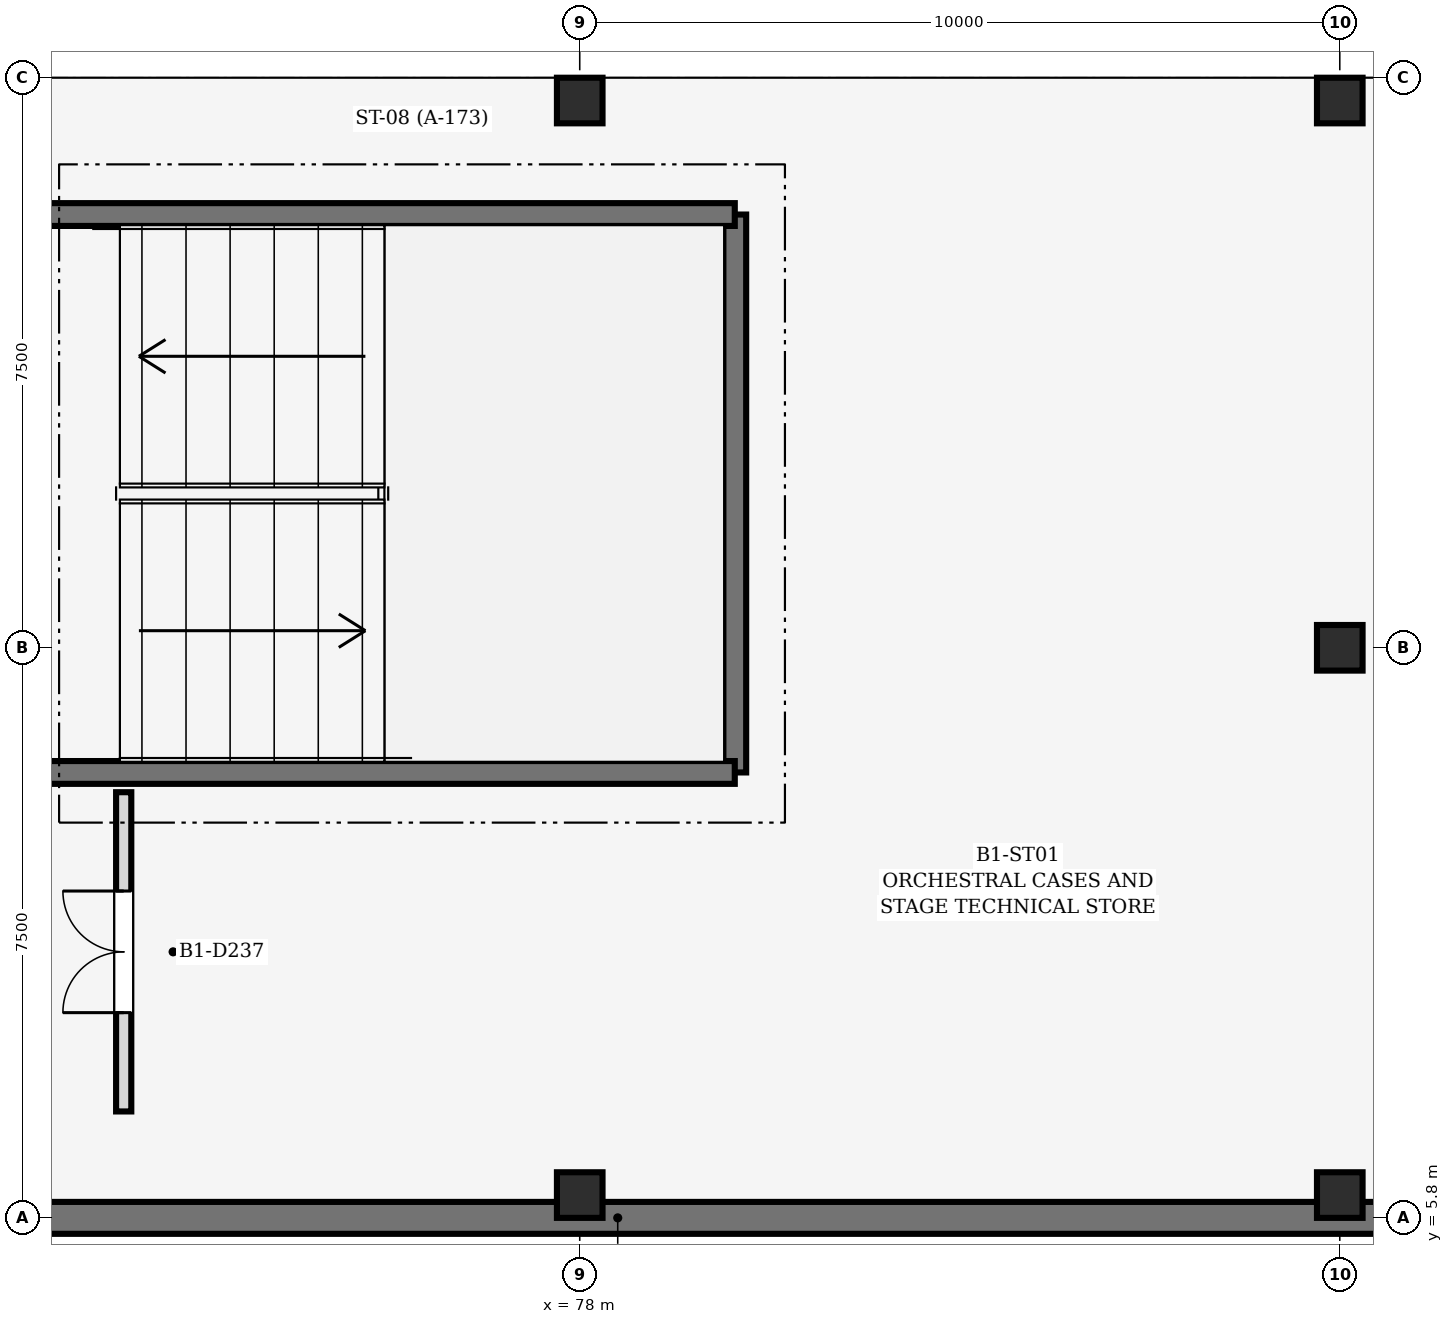
"""IFC4 building model, lengths in metres.
Left out: names, types, materials, properties, quantities, classifications, styles, units other than length and angle.
Written with IfcOpenShell. Run it as: python <this file> out.ifc"""

import sys

from ifc_helpers import new_model, si_unit, direction, frame, frame_2d, origin, origin_2d, place, context, subcontext, project, spatial, rectangle, extrude, element, fill, save


model = new_model("IFC4")
c1 = context("Model", 3, precision=1e-05, world=origin(), true_north=direction((0.0, 1.0)))
c2 = subcontext(c1, "Body", "Model", "MODEL_VIEW")
j1 = project(units=[si_unit("LENGTHUNIT", "METRE"), si_unit("PLANEANGLEUNIT", "RADIAN")], contexts=[c1])
p1 = place(None, origin())
s1 = spatial("IfcSite", under=j1, at=p1, CompositionType="ELEMENT")
p2 = place(p1, origin())
s2 = spatial("IfcBuilding", under=s1, at=p2, CompositionType="ELEMENT")
p3 = place(p2, frame((0.0, 0.0, -4.8)))
s3 = spatial("IfcBuildingStorey", under=s2, at=p3, CompositionType="ELEMENT", Elevation=-4.8)
for number, where, z_axis, x_axis in (
    (1, (78.0, 6.1, 0.0), (0.0, 0.0, 1.0), (1.0, 0.0, 0.0)),
    (2, (78.0, 20.5, 0.0), (0.0, 0.0, 1.0), (1.0, 0.0, 0.0)),
    (3, (88.0, 6.1, 0.0), (0.0, 0.0, 1.0), (1.0, 0.0, 0.0)),
    (4, (88.0, 13.3, 0.0), (0.0, 0.0, 1.0), (1.0, 0.0, 0.0)),
    (5, (88.0, 20.5, 0.0), (0.0, 0.0, 1.0), (1.0, 0.0, 0.0)),
):
    element("IfcColumn", number, at=place(p3, frame(where, z_axis=z_axis, x_axis=x_axis)), inside=s3, PredefinedType="COLUMN", context=c2, shape_type="SweptSolid", body=[
        extrude(rectangle(XDim=0.6, YDim=0.6, at=origin_2d()), origin(), (0.0, 0.0, 1.0), 4.8),
    ])
p4 = place(p3, frame((48.8, 5.8, 0.0), z_axis=(0.0, 0.0, 1.0), x_axis=(1.0, 0.0, 0.0)))
e6 = element("IfcWall", 6, at=p4, inside=s3, PredefinedType="SOLIDWALL", context=c2, shape_type="SweptSolid", body=[
    extrude(rectangle(XDim=47.2, YDim=0.42, at=frame_2d((23.6, 0.0))), origin(), (0.0, 0.0, 1.0), 4.48),
])
p5 = place(p3, frame((80.04, 19.0, 0.0), z_axis=(0.0, 0.0, 1.0), x_axis=(0.0, -1.0, 0.0)))
e7 = element("IfcWall", 7, at=p5, inside=s3, PredefinedType="SHEAR", context=c2, shape_type="SweptSolid", body=[
    extrude(rectangle(XDim=7.34, YDim=0.3, at=frame_2d((3.67, 0.0))), origin(), (0.0, 0.0, 1.0), 4.52),
])
for number, where, z_axis, x_axis in (
    (8, (80.04, 11.66, 0.0), (0.0, 0.0, 1.0), (-1.0, 0.0, 0.0)),
    (9, (68.36, 19.0, 0.0), (0.0, 0.0, 1.0), (1.0, 0.0, 0.0)),
):
    element("IfcWall", number, at=place(p3, frame(where, z_axis=z_axis, x_axis=x_axis)), inside=s3, PredefinedType="SHEAR", context=c2, shape_type="SweptSolid", body=[
        extrude(rectangle(XDim=11.68, YDim=0.3, at=frame_2d((5.84, 0.0))), origin(), (0.0, 0.0, 1.0), 4.52),
    ])
p6 = place(p3, frame((72.0, 7.2, 0.0), z_axis=(0.0, 0.0, 1.0), x_axis=(0.0, 1.0, 0.0)))
e10 = element("IfcWall", 10, at=p6, inside=s3, PredefinedType="PARTITIONING", context=c2, shape_type="SweptSolid", body=[
    extrude(rectangle(XDim=4.2, YDim=0.2, at=frame_2d((2.1, 0.0))), origin(), (0.0, 0.0, 1.0), 4.505),
])
p7 = place(p6, frame((1.3, 0.0, 0.0)))
e11 = element("IfcOpeningElement", 11, at=p7, cuts=e10, PredefinedType="OPENING", context=c2, shape_type="SweptSolid", body=[
    extrude(rectangle(XDim=1.6, YDim=2.15, at=frame_2d((0.8, 1.075))), frame((0.0, 0.112, 0.0), z_axis=(0.0, -1.0, 0.0), x_axis=(1.0, 0.0, 0.0)), (0.0, 0.0, 1.0), 0.224),
])
p8 = place(p7, origin())
e12 = element("IfcDoor", 12, at=p8, inside=s3, OperationType="DOUBLE_DOOR_SINGLE_SWING", PredefinedType="DOOR", context=c2, shape_type="SweptSolid", body=[
    extrude(rectangle(XDim=1.6, YDim=2.15, at=frame_2d((0.8, 1.075))), frame((0.0, 0.025, 0.0), z_axis=(0.0, -1.0, 0.0), x_axis=(1.0, 0.0, 0.0)), (0.0, 0.0, 1.0), 0.05),
])
fill(e11, e12)
save(model, sys.argv[1])
